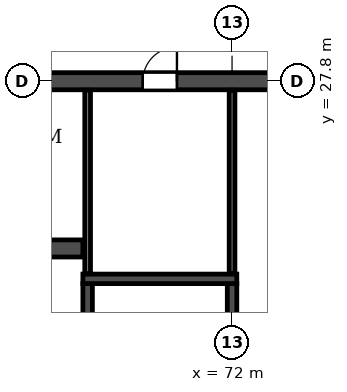
"""IFC4 building model, lengths in metres.
Left out: names, types, materials, properties, quantities, classifications, styles, units other than length and angle.
Written with IfcOpenShell. Run it as: python <this file> out.ifc"""

import sys

from ifc_helpers import new_model, si_unit, direction, frame, frame_2d, origin, place, context, subcontext, project, spatial, rectangle, extrude, element, fill, save


model = new_model("IFC4")
c1 = context("Model", 3, precision=1e-05, world=origin(), true_north=direction((0.0, 1.0)))
c2 = subcontext(c1, "Body", "Model", "MODEL_VIEW")
j1 = project(units=[si_unit("LENGTHUNIT", "METRE"), si_unit("PLANEANGLEUNIT", "RADIAN")], contexts=[c1])
p1 = place(None, origin())
s1 = spatial("IfcSite", under=j1, at=p1, CompositionType="ELEMENT")
p2 = place(p1, origin())
s2 = spatial("IfcBuilding", under=s1, at=p2, CompositionType="ELEMENT")
p3 = place(p2, frame((0.0, 0.0, 162.0)))
s3 = spatial("IfcBuildingStorey", under=s2, at=p3, CompositionType="ELEMENT", Elevation=162.0)
p4 = place(p3, frame((18.2, 27.8, 0.0), z_axis=(0.0, 0.0, 1.0), x_axis=(1.0, 0.0, 0.0)))
e1 = element("IfcWall", 1, at=p4, inside=s3, PredefinedType="SOLIDWALL", context=c2, shape_type="SweptSolid", body=[
    extrude(rectangle(XDim=65.6, YDim=0.45, at=frame_2d((32.8, 0.0))), origin(), (0.0, 0.0, 1.0), 2.95),
])
p5 = place(p4, frame((0.7, 0.0, 0.0)))
e2 = element("IfcOpeningElement", 2, at=p5, cuts=e1, PredefinedType="OPENING", context=c2, shape_type="SweptSolid", body=[
    extrude(rectangle(XDim=1.0, YDim=2.1, at=frame_2d((0.5, 1.05))), frame((0.0, 0.235, 0.0), z_axis=(0.0, -1.0, 0.0), x_axis=(1.0, 0.0, 0.0)), (0.0, 0.0, 1.0), 0.47),
])
p6 = place(p4, frame((4.05, 0.0, 0.0)))
e3 = element("IfcOpeningElement", 3, at=p6, cuts=e1, PredefinedType="OPENING", context=c2, shape_type="SweptSolid", body=[
    extrude(rectangle(XDim=0.9, YDim=2.1, at=frame_2d((0.45, 1.05))), frame((0.0, 0.235, 0.0), z_axis=(0.0, -1.0, 0.0), x_axis=(1.0, 0.0, 0.0)), (0.0, 0.0, 1.0), 0.47),
])
p7 = place(p4, frame((13.25, 0.0, 0.0)))
e4 = element("IfcOpeningElement", 4, at=p7, cuts=e1, PredefinedType="OPENING", context=c2, shape_type="SweptSolid", body=[
    extrude(rectangle(XDim=0.9, YDim=2.1, at=frame_2d((0.45, 1.05))), frame((0.0, 0.235, 0.0), z_axis=(0.0, -1.0, 0.0), x_axis=(1.0, 0.0, 0.0)), (0.0, 0.0, 1.0), 0.47),
])
p8 = place(p4, frame((17.7, 0.0, 0.0)))
e5 = element("IfcOpeningElement", 5, at=p8, cuts=e1, PredefinedType="OPENING", context=c2, shape_type="SweptSolid", body=[
    extrude(rectangle(XDim=1.0, YDim=2.1, at=frame_2d((0.5, 1.05))), frame((0.0, 0.235, 0.0), z_axis=(0.0, -1.0, 0.0), x_axis=(1.0, 0.0, 0.0)), (0.0, 0.0, 1.0), 0.47),
])
p9 = place(p4, frame((22.9, 0.0, 0.0)))
e6 = element("IfcOpeningElement", 6, at=p9, cuts=e1, PredefinedType="OPENING", context=c2, shape_type="SweptSolid", body=[
    extrude(rectangle(XDim=1.0, YDim=2.1, at=frame_2d((0.5, 1.05))), frame((0.0, 0.235, 0.0), z_axis=(0.0, -1.0, 0.0), x_axis=(1.0, 0.0, 0.0)), (0.0, 0.0, 1.0), 0.47),
])
p10 = place(p4, frame((29.4, 0.0, 0.0)))
e7 = element("IfcOpeningElement", 7, at=p10, cuts=e1, PredefinedType="OPENING", context=c2, shape_type="SweptSolid", body=[
    extrude(rectangle(XDim=1.0, YDim=2.1, at=frame_2d((0.5, 1.05))), frame((0.0, 0.235, 0.0), z_axis=(0.0, -1.0, 0.0), x_axis=(1.0, 0.0, 0.0)), (0.0, 0.0, 1.0), 0.47),
])
p11 = place(p4, frame((32.3, 0.0, 0.0)))
e8 = element("IfcOpeningElement", 8, at=p11, cuts=e1, PredefinedType="OPENING", context=c2, shape_type="SweptSolid", body=[
    extrude(rectangle(XDim=1.0, YDim=2.1, at=frame_2d((0.5, 1.05))), frame((0.0, 0.235, 0.0), z_axis=(0.0, -1.0, 0.0), x_axis=(1.0, 0.0, 0.0)), (0.0, 0.0, 1.0), 0.47),
])
p12 = place(p4, frame((36.25, 0.0, 0.0)))
e9 = element("IfcOpeningElement", 9, at=p12, cuts=e1, PredefinedType="OPENING", context=c2, shape_type="SweptSolid", body=[
    extrude(rectangle(XDim=1.5, YDim=2.1, at=frame_2d((0.75, 1.05))), frame((0.0, 0.235, 0.0), z_axis=(0.0, -1.0, 0.0), x_axis=(1.0, 0.0, 0.0)), (0.0, 0.0, 1.0), 0.47),
])
p13 = place(p4, frame((41.7, 0.0, 0.0)))
e10 = element("IfcOpeningElement", 10, at=p13, cuts=e1, PredefinedType="OPENING", context=c2, shape_type="SweptSolid", body=[
    extrude(rectangle(XDim=1.0, YDim=2.1, at=frame_2d((0.5, 1.05))), frame((0.0, 0.235, 0.0), z_axis=(0.0, -1.0, 0.0), x_axis=(1.0, 0.0, 0.0)), (0.0, 0.0, 1.0), 0.47),
])
p14 = place(p4, frame((46.9, 0.0, 0.0)))
e11 = element("IfcOpeningElement", 11, at=p14, cuts=e1, PredefinedType="OPENING", context=c2, shape_type="SweptSolid", body=[
    extrude(rectangle(XDim=1.0, YDim=2.1, at=frame_2d((0.5, 1.05))), frame((0.0, 0.235, 0.0), z_axis=(0.0, -1.0, 0.0), x_axis=(1.0, 0.0, 0.0)), (0.0, 0.0, 1.0), 0.47),
])
p15 = place(p4, frame((51.45, 0.0, 0.0)))
e12 = element("IfcOpeningElement", 12, at=p15, cuts=e1, PredefinedType="OPENING", context=c2, shape_type="SweptSolid", body=[
    extrude(rectangle(XDim=0.9, YDim=2.1, at=frame_2d((0.45, 1.05))), frame((0.0, 0.235, 0.0), z_axis=(0.0, -1.0, 0.0), x_axis=(1.0, 0.0, 0.0)), (0.0, 0.0, 1.0), 0.47),
])
p16 = place(p4, frame((60.65, 0.0, 0.0)))
e13 = element("IfcOpeningElement", 13, at=p16, cuts=e1, PredefinedType="OPENING", context=c2, shape_type="SweptSolid", body=[
    extrude(rectangle(XDim=0.9, YDim=2.1, at=frame_2d((0.45, 1.05))), frame((0.0, 0.235, 0.0), z_axis=(0.0, -1.0, 0.0), x_axis=(1.0, 0.0, 0.0)), (0.0, 0.0, 1.0), 0.47),
])
p17 = place(p4, frame((63.9, 0.0, 0.0)))
e14 = element("IfcOpeningElement", 14, at=p17, cuts=e1, PredefinedType="OPENING", context=c2, shape_type="SweptSolid", body=[
    extrude(rectangle(XDim=1.0, YDim=2.1, at=frame_2d((0.5, 1.05))), frame((0.0, 0.235, 0.0), z_axis=(0.0, -1.0, 0.0), x_axis=(1.0, 0.0, 0.0)), (0.0, 0.0, 1.0), 0.47),
])
p18 = place(p3, frame((33.925, 23.4, 0.0), z_axis=(0.0, 0.0, 1.0), x_axis=(1.0, 0.0, 0.0)))
e15 = element("IfcWall", 15, at=p18, inside=s3, PredefinedType="SOLIDWALL", context=c2, shape_type="SweptSolid", body=[
    extrude(rectangle(XDim=34.15, YDim=0.45, at=frame_2d((17.075, 0.0))), origin(), (0.0, 0.0, 1.0), 2.95),
])
p19 = place(p18, frame((16.175, 0.0, 0.0)))
e16 = element("IfcOpeningElement", 16, at=p19, cuts=e15, PredefinedType="OPENING", context=c2, shape_type="SweptSolid", body=[
    extrude(rectangle(XDim=1.8, YDim=2.1, at=frame_2d((0.9, 1.05))), frame((0.0, 0.235, 0.0), z_axis=(0.0, -1.0, 0.0), x_axis=(1.0, 0.0, 0.0)), (0.0, 0.0, 1.0), 0.47),
])
p20 = place(p18, frame((0.625, 0.0, 0.0)))
e17 = element("IfcOpeningElement", 17, at=p20, cuts=e15, PredefinedType="OPENING", context=c2, shape_type="SweptSolid", body=[
    extrude(rectangle(XDim=1.1, YDim=2.1, at=frame_2d((0.55, 1.05))), frame((0.0, 0.235, 0.0), z_axis=(0.0, -1.0, 0.0), x_axis=(1.0, 0.0, 0.0)), (0.0, 0.0, 1.0), 0.47),
])
p21 = place(p18, frame((3.225, 0.0, 0.0)))
e18 = element("IfcOpeningElement", 18, at=p21, cuts=e15, PredefinedType="OPENING", context=c2, shape_type="SweptSolid", body=[
    extrude(rectangle(XDim=1.1, YDim=2.1, at=frame_2d((0.55, 1.05))), frame((0.0, 0.235, 0.0), z_axis=(0.0, -1.0, 0.0), x_axis=(1.0, 0.0, 0.0)), (0.0, 0.0, 1.0), 0.47),
])
p22 = place(p18, frame((5.825, 0.0, 0.0)))
e19 = element("IfcOpeningElement", 19, at=p22, cuts=e15, PredefinedType="OPENING", context=c2, shape_type="SweptSolid", body=[
    extrude(rectangle(XDim=1.1, YDim=2.1, at=frame_2d((0.55, 1.05))), frame((0.0, 0.235, 0.0), z_axis=(0.0, -1.0, 0.0), x_axis=(1.0, 0.0, 0.0)), (0.0, 0.0, 1.0), 0.47),
])
p23 = place(p18, frame((8.425, 0.0, 0.0)))
e20 = element("IfcOpeningElement", 20, at=p23, cuts=e15, PredefinedType="OPENING", context=c2, shape_type="SweptSolid", body=[
    extrude(rectangle(XDim=1.1, YDim=2.1, at=frame_2d((0.55, 1.05))), frame((0.0, 0.235, 0.0), z_axis=(0.0, -1.0, 0.0), x_axis=(1.0, 0.0, 0.0)), (0.0, 0.0, 1.0), 0.47),
])
p24 = place(p18, frame((11.025, 0.0, 0.0)))
e21 = element("IfcOpeningElement", 21, at=p24, cuts=e15, PredefinedType="OPENING", context=c2, shape_type="SweptSolid", body=[
    extrude(rectangle(XDim=1.1, YDim=2.1, at=frame_2d((0.55, 1.05))), frame((0.0, 0.235, 0.0), z_axis=(0.0, -1.0, 0.0), x_axis=(1.0, 0.0, 0.0)), (0.0, 0.0, 1.0), 0.47),
])
p25 = place(p18, frame((13.625, 0.0, 0.0)))
e22 = element("IfcOpeningElement", 22, at=p25, cuts=e15, PredefinedType="OPENING", context=c2, shape_type="SweptSolid", body=[
    extrude(rectangle(XDim=1.1, YDim=2.1, at=frame_2d((0.55, 1.05))), frame((0.0, 0.235, 0.0), z_axis=(0.0, -1.0, 0.0), x_axis=(1.0, 0.0, 0.0)), (0.0, 0.0, 1.0), 0.47),
])
p26 = place(p18, frame((27.225, 0.0, 0.0)))
e23 = element("IfcOpeningElement", 23, at=p26, cuts=e15, PredefinedType="OPENING", context=c2, shape_type="SweptSolid", body=[
    extrude(rectangle(XDim=1.1, YDim=2.1, at=frame_2d((0.55, 1.05))), frame((0.0, 0.235, 0.0), z_axis=(0.0, -1.0, 0.0), x_axis=(1.0, 0.0, 0.0)), (0.0, 0.0, 1.0), 0.47),
])
p27 = place(p3, frame((68.2, 14.825, 0.0), z_axis=(0.0, 0.0, 1.0), x_axis=(0.0, 1.0, 0.0)))
e24 = element("IfcWall", 24, at=p27, inside=s3, PredefinedType="SOLIDWALL", context=c2, shape_type="SweptSolid", body=[
    extrude(rectangle(XDim=7.65, YDim=0.25, at=frame_2d((3.825, 0.0))), origin(), (0.0, 0.0, 1.0), 2.95),
])
p28 = place(p27, frame((0.475, 0.0, 0.0)))
e25 = element("IfcOpeningElement", 25, at=p28, cuts=e24, PredefinedType="OPENING", context=c2, shape_type="SweptSolid", body=[
    extrude(rectangle(XDim=1.0, YDim=2.1, at=frame_2d((0.5, 1.05))), frame((0.0, 0.135, 0.0), z_axis=(0.0, -1.0, 0.0), x_axis=(1.0, 0.0, 0.0)), (0.0, 0.0, 1.0), 0.27),
])
p29 = place(p3, frame((72.0, 14.825, 0.0), z_axis=(0.0, 0.0, 1.0), x_axis=(0.0, 1.0, 0.0)))
e26 = element("IfcWall", 26, at=p29, inside=s3, PredefinedType="SOLIDWALL", context=c2, shape_type="SweptSolid", body=[
    extrude(rectangle(XDim=7.65, YDim=0.25, at=frame_2d((3.825, 0.0))), origin(), (0.0, 0.0, 1.0), 2.95),
])
p30 = place(p3, frame((68.075, 22.6, 0.0), z_axis=(0.0, 0.0, 1.0), x_axis=(1.0, 0.0, 0.0)))
e27 = element("IfcWall", 27, at=p30, inside=s3, PredefinedType="SOLIDWALL", context=c2, shape_type="SweptSolid", body=[
    extrude(rectangle(XDim=4.05, YDim=0.25, at=frame_2d((2.025, 0.0))), origin(), (0.0, 0.0, 1.0), 2.95),
])
for number, where, z_axis, x_axis in (
    (28, (68.2, 22.735, 0.0), (0.0, 0.0, 1.0), (0.0, 1.0, 0.0)),
    (29, (72.0, 22.735, 0.0), (0.0, 0.0, 1.0), (0.0, 1.0, 0.0)),
):
    element("IfcWall", number, at=place(p3, frame(where, z_axis=z_axis, x_axis=x_axis)), inside=s3, PredefinedType="PARTITIONING", context=c2, shape_type="SweptSolid", body=[
        extrude(rectangle(XDim=4.83, YDim=0.15, at=frame_2d((2.415, 0.0))), origin(), (0.0, 0.0, 1.0), 2.95),
    ])
p31 = place(p15, origin())
e30 = element("IfcDoor", 30, at=p31, inside=s3, OperationType="SINGLE_SWING_RIGHT", PredefinedType="DOOR", context=c2, shape_type="SweptSolid", body=[
    extrude(rectangle(XDim=0.9, YDim=2.1, at=frame_2d((0.45, 1.05))), frame((0.0, 0.025, 0.0), z_axis=(0.0, -1.0, 0.0), x_axis=(1.0, 0.0, 0.0)), (0.0, 0.0, 1.0), 0.05),
])
fill(e12, e30)
save(model, sys.argv[1])
